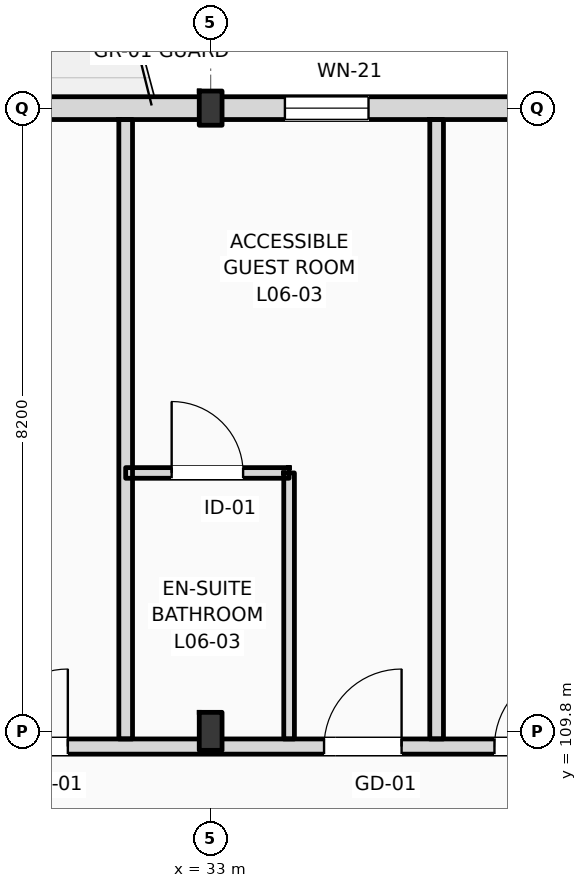
"""IFC4 building model, lengths in metres.
Left out: names, types, materials, properties, quantities, classifications, styles, units other than length and angle.
Written with IfcOpenShell. Run it as: python <this file> out.ifc"""

import sys

from ifc_helpers import new_model, si_unit, direction, frame, frame_2d, origin, origin_2d, place, context, subcontext, project, spatial, rectangle, i_section, extrude, element, fill, save


model = new_model("IFC4")
c1 = context("Model", 3, precision=1e-05, world=origin(), true_north=direction((0.0, 1.0)))
c2 = subcontext(c1, "Body", "Model", "MODEL_VIEW")
j1 = project(units=[si_unit("LENGTHUNIT", "METRE"), si_unit("PLANEANGLEUNIT", "RADIAN")], contexts=[c1])
p1 = place(None, origin())
s1 = spatial("IfcSite", under=j1, at=p1, CompositionType="ELEMENT")
p2 = place(p1, origin())
s2 = spatial("IfcBuilding", under=s1, at=p2, CompositionType="ELEMENT")
p3 = place(p2, frame((0.0, 0.0, 28.2)))
s3 = spatial("IfcBuildingStorey", under=s2, at=p3, CompositionType="ELEMENT", Elevation=28.2)
p4 = place(p3, frame((33.0, 109.8, 0.0), z_axis=(0.0, 0.0, 1.0), x_axis=(1.0, 0.0, 0.0)))
e1 = element("IfcColumn", 1, at=p4, inside=s3, PredefinedType="COLUMN", context=c2, shape_type="SweptSolid", body=[
    extrude(i_section(OverallWidth=0.3, OverallDepth=0.5, WebThickness=0.014, FlangeThickness=0.028, FilletRadius=0.027, at=origin_2d()), origin(), (0.0, 0.0, 1.0), 3.6),
])
p5 = place(p3, frame((33.0, 118.0, 0.0), z_axis=(0.0, 0.0, 1.0), x_axis=(1.0, 0.0, 0.0)))
e2 = element("IfcColumn", 2, at=p5, inside=s3, PredefinedType="COLUMN", context=c2, shape_type="SweptSolid", body=[
    extrude(i_section(OverallWidth=0.3, OverallDepth=0.45, WebThickness=0.014, FlangeThickness=0.026, FilletRadius=0.027, at=origin_2d()), origin(), (0.0, 0.0, 1.0), 3.6),
])
p6 = place(p3, frame((22.5, 118.0, 0.0), z_axis=(0.0, 0.0, 1.0), x_axis=(1.0, 0.0, 0.0)))
e3 = element("IfcWall", 3, at=p6, inside=s3, PredefinedType="STANDARD", context=c2, shape_type="SweptSolid", body=[
    extrude(rectangle(XDim=97.5, YDim=0.3, at=frame_2d((48.75, 0.0))), origin(), (0.0, 0.0, 1.0), 2.8),
])
p7 = place(p6, frame((0.91, 0.0, 0.9)))
e4 = element("IfcOpeningElement", 4, at=p7, cuts=e3, PredefinedType="OPENING", context=c2, shape_type="SweptSolid", body=[
    extrude(rectangle(XDim=0.9, YDim=1.72, at=frame_2d((0.45, 0.86))), frame((0.0, 0.16, 0.0), z_axis=(0.0, -1.0, 0.0), x_axis=(1.0, 0.0, 0.0)), (0.0, 0.0, 1.0), 0.32),
])
p8 = place(p6, frame((6.561, 0.0, 0.0)))
e5 = element("IfcOpeningElement", 5, at=p8, cuts=e3, PredefinedType="OPENING", context=c2, shape_type="SweptSolid", body=[
    extrude(rectangle(XDim=1.2, YDim=2.25, at=frame_2d((0.6, 1.125))), frame((0.0, 0.16, 0.0), z_axis=(0.0, -1.0, 0.0), x_axis=(1.0, 0.0, 0.0)), (0.0, 0.0, 1.0), 0.32),
])
p9 = place(p6, frame((11.477, 0.0, 0.9)))
e6 = element("IfcOpeningElement", 6, at=p9, cuts=e3, PredefinedType="OPENING", context=c2, shape_type="SweptSolid", body=[
    extrude(rectangle(XDim=1.1, YDim=1.5, at=frame_2d((0.55, 0.75))), frame((0.0, 0.16, 0.0), z_axis=(0.0, -1.0, 0.0), x_axis=(1.0, 0.0, 0.0)), (0.0, 0.0, 1.0), 0.32),
])
p10 = place(p6, frame((15.194, 0.0, 0.9)))
e7 = element("IfcOpeningElement", 7, at=p10, cuts=e3, PredefinedType="OPENING", context=c2, shape_type="SweptSolid", body=[
    extrude(rectangle(XDim=1.25, YDim=1.6, at=frame_2d((0.625, 0.8))), frame((0.0, 0.16, 0.0), z_axis=(0.0, -1.0, 0.0), x_axis=(1.0, 0.0, 0.0)), (0.0, 0.0, 1.0), 0.32),
])
p11 = place(p6, frame((19.509, 0.0, 0.9)))
e8 = element("IfcOpeningElement", 8, at=p11, cuts=e3, PredefinedType="OPENING", context=c2, shape_type="SweptSolid", body=[
    extrude(rectangle(XDim=1.4, YDim=1.7, at=frame_2d((0.7, 0.85))), frame((0.0, 0.16, 0.0), z_axis=(0.0, -1.0, 0.0), x_axis=(1.0, 0.0, 0.0)), (0.0, 0.0, 1.0), 0.32),
])
p12 = place(p6, frame((23.258, 0.0, 0.0)))
e9 = element("IfcOpeningElement", 9, at=p12, cuts=e3, PredefinedType="OPENING", context=c2, shape_type="SweptSolid", body=[
    extrude(rectangle(XDim=1.2, YDim=2.25, at=frame_2d((0.6, 1.125))), frame((0.0, 0.16, 0.0), z_axis=(0.0, -1.0, 0.0), x_axis=(1.0, 0.0, 0.0)), (0.0, 0.0, 1.0), 0.32),
])
p13 = place(p6, frame((28.115, 0.0, 0.9)))
e10 = element("IfcOpeningElement", 10, at=p13, cuts=e3, PredefinedType="OPENING", context=c2, shape_type="SweptSolid", body=[
    extrude(rectangle(XDim=1.75, YDim=1.72, at=frame_2d((0.875, 0.86))), frame((0.0, 0.16, 0.0), z_axis=(0.0, -1.0, 0.0), x_axis=(1.0, 0.0, 0.0)), (0.0, 0.0, 1.0), 0.32),
])
p14 = place(p6, frame((31.582, 0.0, 0.9)))
e11 = element("IfcOpeningElement", 11, at=p14, cuts=e3, PredefinedType="OPENING", context=c2, shape_type="SweptSolid", body=[
    extrude(rectangle(XDim=1.35, YDim=1.72, at=frame_2d((0.675, 0.86))), frame((0.0, 0.16, 0.0), z_axis=(0.0, -1.0, 0.0), x_axis=(1.0, 0.0, 0.0)), (0.0, 0.0, 1.0), 0.32),
])
p15 = place(p6, frame((37.379, 0.0, 0.0)))
e12 = element("IfcOpeningElement", 12, at=p15, cuts=e3, PredefinedType="OPENING", context=c2, shape_type="SweptSolid", body=[
    extrude(rectangle(XDim=1.2, YDim=2.25, at=frame_2d((0.6, 1.125))), frame((0.0, 0.16, 0.0), z_axis=(0.0, -1.0, 0.0), x_axis=(1.0, 0.0, 0.0)), (0.0, 0.0, 1.0), 0.32),
])
p16 = place(p6, frame((42.663, 0.0, 0.9)))
e13 = element("IfcOpeningElement", 13, at=p16, cuts=e3, PredefinedType="OPENING", context=c2, shape_type="SweptSolid", body=[
    extrude(rectangle(XDim=1.35, YDim=1.72, at=frame_2d((0.675, 0.86))), frame((0.0, 0.16, 0.0), z_axis=(0.0, -1.0, 0.0), x_axis=(1.0, 0.0, 0.0)), (0.0, 0.0, 1.0), 0.32),
])
p17 = place(p6, frame((45.119, 0.0, 0.9)))
e14 = element("IfcOpeningElement", 14, at=p17, cuts=e3, PredefinedType="OPENING", context=c2, shape_type="SweptSolid", body=[
    extrude(rectangle(XDim=2.871, YDim=1.72, at=frame_2d((1.436, 0.86))), frame((0.0, 0.16, 0.0), z_axis=(0.0, -1.0, 0.0), x_axis=(1.0, 0.0, 0.0)), (0.0, 0.0, 1.0), 0.32),
])
p18 = place(p6, frame((50.41, 0.0, 0.9)))
e15 = element("IfcOpeningElement", 15, at=p18, cuts=e3, PredefinedType="OPENING", context=c2, shape_type="SweptSolid", body=[
    extrude(rectangle(XDim=1.8, YDim=1.72, at=frame_2d((0.9, 0.86))), frame((0.0, 0.16, 0.0), z_axis=(0.0, -1.0, 0.0), x_axis=(1.0, 0.0, 0.0)), (0.0, 0.0, 1.0), 0.32),
])
p19 = place(p6, frame((54.375, 0.0, 0.0)))
e16 = element("IfcOpeningElement", 16, at=p19, cuts=e3, PredefinedType="OPENING", context=c2, shape_type="SweptSolid", body=[
    extrude(rectangle(XDim=1.2, YDim=2.25, at=frame_2d((0.6, 1.125))), frame((0.0, 0.16, 0.0), z_axis=(0.0, -1.0, 0.0), x_axis=(1.0, 0.0, 0.0)), (0.0, 0.0, 1.0), 0.32),
])
p20 = place(p6, frame((59.052, 0.0, 0.9)))
e17 = element("IfcOpeningElement", 17, at=p20, cuts=e3, PredefinedType="OPENING", context=c2, shape_type="SweptSolid", body=[
    extrude(rectangle(XDim=1.35, YDim=1.72, at=frame_2d((0.675, 0.86))), frame((0.0, 0.16, 0.0), z_axis=(0.0, -1.0, 0.0), x_axis=(1.0, 0.0, 0.0)), (0.0, 0.0, 1.0), 0.32),
])
p21 = place(p6, frame((62.768, 0.0, 0.9)))
e18 = element("IfcOpeningElement", 18, at=p21, cuts=e3, PredefinedType="OPENING", context=c2, shape_type="SweptSolid", body=[
    extrude(rectangle(XDim=1.5, YDim=1.72, at=frame_2d((0.75, 0.86))), frame((0.0, 0.16, 0.0), z_axis=(0.0, -1.0, 0.0), x_axis=(1.0, 0.0, 0.0)), (0.0, 0.0, 1.0), 0.32),
])
p22 = place(p6, frame((68.498, 0.0, 0.0)))
e19 = element("IfcOpeningElement", 19, at=p22, cuts=e3, PredefinedType="OPENING", context=c2, shape_type="SweptSolid", body=[
    extrude(rectangle(XDim=1.2, YDim=2.25, at=frame_2d((0.6, 1.125))), frame((0.0, 0.16, 0.0), z_axis=(0.0, -1.0, 0.0), x_axis=(1.0, 0.0, 0.0)), (0.0, 0.0, 1.0), 0.32),
])
p23 = place(p6, frame((71.265, 0.0, 0.9)))
e20 = element("IfcOpeningElement", 20, at=p23, cuts=e3, PredefinedType="OPENING", context=c2, shape_type="SweptSolid", body=[
    extrude(rectangle(XDim=0.9, YDim=1.72, at=frame_2d((0.45, 0.86))), frame((0.0, 0.16, 0.0), z_axis=(0.0, -1.0, 0.0), x_axis=(1.0, 0.0, 0.0)), (0.0, 0.0, 1.0), 0.32),
])
p24 = place(p6, frame((76.316, 0.0, 0.9)))
e21 = element("IfcOpeningElement", 21, at=p24, cuts=e3, PredefinedType="OPENING", context=c2, shape_type="SweptSolid", body=[
    extrude(rectangle(XDim=1.95, YDim=1.72, at=frame_2d((0.975, 0.86))), frame((0.0, 0.16, 0.0), z_axis=(0.0, -1.0, 0.0), x_axis=(1.0, 0.0, 0.0)), (0.0, 0.0, 1.0), 0.32),
])
p25 = place(p6, frame((81.632, 0.0, 0.9)))
e22 = element("IfcOpeningElement", 22, at=p25, cuts=e3, PredefinedType="OPENING", context=c2, shape_type="SweptSolid", body=[
    extrude(rectangle(XDim=1.35, YDim=1.72, at=frame_2d((0.675, 0.86))), frame((0.0, 0.16, 0.0), z_axis=(0.0, -1.0, 0.0), x_axis=(1.0, 0.0, 0.0)), (0.0, 0.0, 1.0), 0.32),
])
p26 = place(p6, frame((84.948, 0.0, 0.9)))
e23 = element("IfcOpeningElement", 23, at=p26, cuts=e3, PredefinedType="OPENING", context=c2, shape_type="SweptSolid", body=[
    extrude(rectangle(XDim=2.25, YDim=1.72, at=frame_2d((1.125, 0.86))), frame((0.0, 0.16, 0.0), z_axis=(0.0, -1.0, 0.0), x_axis=(1.0, 0.0, 0.0)), (0.0, 0.0, 1.0), 0.32),
])
p27 = place(p6, frame((90.063, 0.0, 0.9)))
e24 = element("IfcOpeningElement", 24, at=p27, cuts=e3, PredefinedType="OPENING", context=c2, shape_type="SweptSolid", body=[
    extrude(rectangle(XDim=1.8, YDim=1.72, at=frame_2d((0.9, 0.86))), frame((0.0, 0.16, 0.0), z_axis=(0.0, -1.0, 0.0), x_axis=(1.0, 0.0, 0.0)), (0.0, 0.0, 1.0), 0.32),
])
p28 = place(p6, frame((93.529, 0.0, 0.9)))
e25 = element("IfcOpeningElement", 25, at=p28, cuts=e3, PredefinedType="OPENING", context=c2, shape_type="SweptSolid", body=[
    extrude(rectangle(XDim=2.55, YDim=1.72, at=frame_2d((1.275, 0.86))), frame((0.0, 0.16, 0.0), z_axis=(0.0, -1.0, 0.0), x_axis=(1.0, 0.0, 0.0)), (0.0, 0.0, 1.0), 0.32),
])
p29 = place(p3, frame((10.65, 109.6, 0.0), z_axis=(0.0, 0.0, 1.0), x_axis=(1.0, 0.0, 0.0)))
e26 = element("IfcWall", 26, at=p29, inside=s3, PredefinedType="PARTITIONING", context=c2, shape_type="SweptSolid", body=[
    extrude(rectangle(XDim=109.21, YDim=0.2, at=frame_2d((54.605, 0.0))), origin(), (0.0, 0.0, 1.0), 2.8),
])
p30 = place(p29, frame((12.611, 0.0, 0.0)))
e27 = element("IfcOpeningElement", 27, at=p30, cuts=e26, PredefinedType="OPENING", context=c2, shape_type="SweptSolid", body=[
    extrude(rectangle(XDim=1.02, YDim=2.2, at=frame_2d((0.51, 1.1))), frame((0.0, 0.11, 0.0), z_axis=(0.0, -1.0, 0.0), x_axis=(1.0, 0.0, 0.0)), (0.0, 0.0, 1.0), 0.22),
])
p31 = place(p29, frame((19.451, 0.0, 0.0)))
e28 = element("IfcOpeningElement", 28, at=p31, cuts=e26, PredefinedType="OPENING", context=c2, shape_type="SweptSolid", body=[
    extrude(rectangle(XDim=1.02, YDim=2.2, at=frame_2d((0.51, 1.1))), frame((0.0, 0.11, 0.0), z_axis=(0.0, -1.0, 0.0), x_axis=(1.0, 0.0, 0.0)), (0.0, 0.0, 1.0), 0.22),
])
p32 = place(p29, frame((23.842, 0.0, 0.0)))
e29 = element("IfcOpeningElement", 29, at=p32, cuts=e26, PredefinedType="OPENING", context=c2, shape_type="SweptSolid", body=[
    extrude(rectangle(XDim=1.02, YDim=2.2, at=frame_2d((0.51, 1.1))), frame((0.0, 0.11, 0.0), z_axis=(0.0, -1.0, 0.0), x_axis=(1.0, 0.0, 0.0)), (0.0, 0.0, 1.0), 0.22),
])
p33 = place(p29, frame((26.084, 0.0, 0.0)))
e30 = element("IfcOpeningElement", 30, at=p33, cuts=e26, PredefinedType="OPENING", context=c2, shape_type="SweptSolid", body=[
    extrude(rectangle(XDim=1.02, YDim=2.2, at=frame_2d((0.51, 1.1))), frame((0.0, 0.11, 0.0), z_axis=(0.0, -1.0, 0.0), x_axis=(1.0, 0.0, 0.0)), (0.0, 0.0, 1.0), 0.22),
])
p34 = place(p29, frame((32.655, 0.0, 0.0)))
e31 = element("IfcOpeningElement", 31, at=p34, cuts=e26, PredefinedType="OPENING", context=c2, shape_type="SweptSolid", body=[
    extrude(rectangle(XDim=0.96, YDim=2.2, at=frame_2d((0.48, 1.1))), frame((0.0, 0.11, 0.0), z_axis=(0.0, -1.0, 0.0), x_axis=(1.0, 0.0, 0.0)), (0.0, 0.0, 1.0), 0.22),
])
p35 = place(p29, frame((34.895, 0.0, 0.0)))
e32 = element("IfcOpeningElement", 32, at=p35, cuts=e26, PredefinedType="OPENING", context=c2, shape_type="SweptSolid", body=[
    extrude(rectangle(XDim=0.96, YDim=2.2, at=frame_2d((0.48, 1.1))), frame((0.0, 0.11, 0.0), z_axis=(0.0, -1.0, 0.0), x_axis=(1.0, 0.0, 0.0)), (0.0, 0.0, 1.0), 0.22),
])
p36 = place(p29, frame((41.436, 0.0, 0.0)))
e33 = element("IfcOpeningElement", 33, at=p36, cuts=e26, PredefinedType="OPENING", context=c2, shape_type="SweptSolid", body=[
    extrude(rectangle(XDim=0.96, YDim=2.2, at=frame_2d((0.48, 1.1))), frame((0.0, 0.11, 0.0), z_axis=(0.0, -1.0, 0.0), x_axis=(1.0, 0.0, 0.0)), (0.0, 0.0, 1.0), 0.22),
])
p37 = place(p29, frame((43.427, 0.0, 0.0)))
e34 = element("IfcOpeningElement", 34, at=p37, cuts=e26, PredefinedType="OPENING", context=c2, shape_type="SweptSolid", body=[
    extrude(rectangle(XDim=0.96, YDim=2.2, at=frame_2d((0.48, 1.1))), frame((0.0, 0.11, 0.0), z_axis=(0.0, -1.0, 0.0), x_axis=(1.0, 0.0, 0.0)), (0.0, 0.0, 1.0), 0.22),
])
p38 = place(p29, frame((50.218, 0.0, 0.0)))
e35 = element("IfcOpeningElement", 35, at=p38, cuts=e26, PredefinedType="OPENING", context=c2, shape_type="SweptSolid", body=[
    extrude(rectangle(XDim=0.96, YDim=2.2, at=frame_2d((0.48, 1.1))), frame((0.0, 0.11, 0.0), z_axis=(0.0, -1.0, 0.0), x_axis=(1.0, 0.0, 0.0)), (0.0, 0.0, 1.0), 0.22),
])
p39 = place(p29, frame((54.859, 0.0, 0.0)))
e36 = element("IfcOpeningElement", 36, at=p39, cuts=e26, PredefinedType="OPENING", context=c2, shape_type="SweptSolid", body=[
    extrude(rectangle(XDim=0.96, YDim=2.2, at=frame_2d((0.48, 1.1))), frame((0.0, 0.11, 0.0), z_axis=(0.0, -1.0, 0.0), x_axis=(1.0, 0.0, 0.0)), (0.0, 0.0, 1.0), 0.22),
])
p40 = place(p29, frame((59.0, 0.0, 0.0)))
e37 = element("IfcOpeningElement", 37, at=p40, cuts=e26, PredefinedType="OPENING", context=c2, shape_type="SweptSolid", body=[
    extrude(rectangle(XDim=0.96, YDim=2.2, at=frame_2d((0.48, 1.1))), frame((0.0, 0.11, 0.0), z_axis=(0.0, -1.0, 0.0), x_axis=(1.0, 0.0, 0.0)), (0.0, 0.0, 1.0), 0.22),
])
p41 = place(p29, frame((63.39, 0.0, 0.0)))
e38 = element("IfcOpeningElement", 38, at=p41, cuts=e26, PredefinedType="OPENING", context=c2, shape_type="SweptSolid", body=[
    extrude(rectangle(XDim=0.96, YDim=2.2, at=frame_2d((0.48, 1.1))), frame((0.0, 0.11, 0.0), z_axis=(0.0, -1.0, 0.0), x_axis=(1.0, 0.0, 0.0)), (0.0, 0.0, 1.0), 0.22),
])
p42 = place(p29, frame((65.631, 0.0, 0.0)))
e39 = element("IfcOpeningElement", 39, at=p42, cuts=e26, PredefinedType="OPENING", context=c2, shape_type="SweptSolid", body=[
    extrude(rectangle(XDim=0.96, YDim=2.2, at=frame_2d((0.48, 1.1))), frame((0.0, 0.11, 0.0), z_axis=(0.0, -1.0, 0.0), x_axis=(1.0, 0.0, 0.0)), (0.0, 0.0, 1.0), 0.22),
])
p43 = place(p29, frame((72.172, 0.0, 0.0)))
e40 = element("IfcOpeningElement", 40, at=p43, cuts=e26, PredefinedType="OPENING", context=c2, shape_type="SweptSolid", body=[
    extrude(rectangle(XDim=0.96, YDim=2.2, at=frame_2d((0.48, 1.1))), frame((0.0, 0.11, 0.0), z_axis=(0.0, -1.0, 0.0), x_axis=(1.0, 0.0, 0.0)), (0.0, 0.0, 1.0), 0.22),
])
p44 = place(p29, frame((74.413, 0.0, 0.0)))
e41 = element("IfcOpeningElement", 41, at=p44, cuts=e26, PredefinedType="OPENING", context=c2, shape_type="SweptSolid", body=[
    extrude(rectangle(XDim=0.96, YDim=2.2, at=frame_2d((0.48, 1.1))), frame((0.0, 0.11, 0.0), z_axis=(0.0, -1.0, 0.0), x_axis=(1.0, 0.0, 0.0)), (0.0, 0.0, 1.0), 0.22),
])
p45 = place(p29, frame((80.954, 0.0, 0.0)))
e42 = element("IfcOpeningElement", 42, at=p45, cuts=e26, PredefinedType="OPENING", context=c2, shape_type="SweptSolid", body=[
    extrude(rectangle(XDim=0.96, YDim=2.2, at=frame_2d((0.48, 1.1))), frame((0.0, 0.11, 0.0), z_axis=(0.0, -1.0, 0.0), x_axis=(1.0, 0.0, 0.0)), (0.0, 0.0, 1.0), 0.22),
])
p46 = place(p29, frame((83.195, 0.0, 0.0)))
e43 = element("IfcOpeningElement", 43, at=p46, cuts=e26, PredefinedType="OPENING", context=c2, shape_type="SweptSolid", body=[
    extrude(rectangle(XDim=0.96, YDim=2.2, at=frame_2d((0.48, 1.1))), frame((0.0, 0.11, 0.0), z_axis=(0.0, -1.0, 0.0), x_axis=(1.0, 0.0, 0.0)), (0.0, 0.0, 1.0), 0.22),
])
p47 = place(p29, frame((89.735, 0.0, 0.0)))
e44 = element("IfcOpeningElement", 44, at=p47, cuts=e26, PredefinedType="OPENING", context=c2, shape_type="SweptSolid", body=[
    extrude(rectangle(XDim=0.96, YDim=2.2, at=frame_2d((0.48, 1.1))), frame((0.0, 0.11, 0.0), z_axis=(0.0, -1.0, 0.0), x_axis=(1.0, 0.0, 0.0)), (0.0, 0.0, 1.0), 0.22),
])
p48 = place(p29, frame((94.126, 0.0, 0.0)))
e45 = element("IfcOpeningElement", 45, at=p48, cuts=e26, PredefinedType="OPENING", context=c2, shape_type="SweptSolid", body=[
    extrude(rectangle(XDim=0.96, YDim=2.2, at=frame_2d((0.48, 1.1))), frame((0.0, 0.11, 0.0), z_axis=(0.0, -1.0, 0.0), x_axis=(1.0, 0.0, 0.0)), (0.0, 0.0, 1.0), 0.22),
])
p49 = place(p29, frame((98.517, 0.0, 0.0)))
e46 = element("IfcOpeningElement", 46, at=p49, cuts=e26, PredefinedType="OPENING", context=c2, shape_type="SweptSolid", body=[
    extrude(rectangle(XDim=0.96, YDim=2.2, at=frame_2d((0.48, 1.1))), frame((0.0, 0.11, 0.0), z_axis=(0.0, -1.0, 0.0), x_axis=(1.0, 0.0, 0.0)), (0.0, 0.0, 1.0), 0.22),
])
p50 = place(p29, frame((102.908, 0.0, 0.0)))
e47 = element("IfcOpeningElement", 47, at=p50, cuts=e26, PredefinedType="OPENING", context=c2, shape_type="SweptSolid", body=[
    extrude(rectangle(XDim=0.96, YDim=2.2, at=frame_2d((0.48, 1.1))), frame((0.0, 0.11, 0.0), z_axis=(0.0, -1.0, 0.0), x_axis=(1.0, 0.0, 0.0)), (0.0, 0.0, 1.0), 0.22),
])
p51 = place(p29, frame((105.099, 0.0, 0.0)))
e48 = element("IfcOpeningElement", 48, at=p51, cuts=e26, PredefinedType="OPENING", context=c2, shape_type="SweptSolid", body=[
    extrude(rectangle(XDim=0.96, YDim=2.2, at=frame_2d((0.48, 1.1))), frame((0.0, 0.11, 0.0), z_axis=(0.0, -1.0, 0.0), x_axis=(1.0, 0.0, 0.0)), (0.0, 0.0, 1.0), 0.22),
])
p52 = place(p29, frame((2.716, 0.0, 0.0)))
e49 = element("IfcOpeningElement", 49, at=p52, cuts=e26, PredefinedType="OPENING", context=c2, shape_type="SweptSolid", body=[
    extrude(rectangle(XDim=1.35, YDim=2.25, at=frame_2d((0.675, 1.125))), frame((0.0, 0.11, 0.0), z_axis=(0.0, -1.0, 0.0), x_axis=(1.0, 0.0, 0.0)), (0.0, 0.0, 1.0), 0.22),
])
p53 = place(p29, frame((6.65, 0.0, 0.0)))
e50 = element("IfcOpeningElement", 50, at=p53, cuts=e26, PredefinedType="OPENING", context=c2, shape_type="SweptSolid", body=[
    extrude(rectangle(XDim=1.35, YDim=2.25, at=frame_2d((0.675, 1.125))), frame((0.0, 0.11, 0.0), z_axis=(0.0, -1.0, 0.0), x_axis=(1.0, 0.0, 0.0)), (0.0, 0.0, 1.0), 0.22),
])
p54 = place(p29, frame((10.583, 0.0, 0.0)))
e51 = element("IfcOpeningElement", 51, at=p54, cuts=e26, PredefinedType="OPENING", context=c2, shape_type="SweptSolid", body=[
    extrude(rectangle(XDim=1.35, YDim=2.25, at=frame_2d((0.675, 1.125))), frame((0.0, 0.11, 0.0), z_axis=(0.0, -1.0, 0.0), x_axis=(1.0, 0.0, 0.0)), (0.0, 0.0, 1.0), 0.22),
])
for number, where, z_axis, x_axis in (
    (52, (31.882, 109.7, 0.0), (0.0, 0.0, 1.0), (0.0, 1.0, 0.0)),
    (53, (35.973, 109.7, 0.0), (0.0, 0.0, 1.0), (0.0, 1.0, 0.0)),
):
    element("IfcWall", number, at=place(p3, frame(where, z_axis=z_axis, x_axis=x_axis)), inside=s3, PredefinedType="PARTITIONING", context=c2, shape_type="SweptSolid", body=[
        extrude(rectangle(XDim=8.15, YDim=0.18, at=frame_2d((4.075, 0.0))), origin(), (0.0, 0.0, 1.0), 3.36),
    ])
p55 = place(p3, frame((34.032, 109.7, 0.0), z_axis=(0.0, 0.0, 1.0), x_axis=(0.0, 1.0, 0.0)))
e54 = element("IfcWall", 54, at=p55, inside=s3, PredefinedType="PARTITIONING", context=c2, shape_type="SweptSolid", body=[
    extrude(rectangle(XDim=3.5, YDim=0.14, at=frame_2d((1.75, 0.0))), origin(), (0.0, 0.0, 1.0), 3.36),
])
p56 = place(p3, frame((31.882, 113.2, 0.0), z_axis=(0.0, 0.0, 1.0), x_axis=(1.0, 0.0, 0.0)))
e55 = element("IfcWall", 55, at=p56, inside=s3, PredefinedType="PARTITIONING", context=c2, shape_type="SweptSolid", body=[
    extrude(rectangle(XDim=2.15, YDim=0.14, at=frame_2d((1.075, 0.0))), origin(), (0.0, 0.0, 1.0), 3.36),
])
p57 = place(p56, frame((0.605, 0.0, 0.0)))
e56 = element("IfcOpeningElement", 56, at=p57, cuts=e55, PredefinedType="OPENING", context=c2, shape_type="SweptSolid", body=[
    extrude(rectangle(XDim=0.94, YDim=2.15, at=frame_2d((0.47, 1.075))), frame((0.0, 0.08, 0.0), z_axis=(0.0, -1.0, 0.0), x_axis=(1.0, 0.0, 0.0)), (0.0, 0.0, 1.0), 0.16),
])
p58 = place(p9, origin())
e57 = element("IfcWindow", 57, at=p58, inside=s3, PartitioningType="DOUBLE_PANEL_VERTICAL", PredefinedType="WINDOW", context=c2, shape_type="SweptSolid", body=[
    extrude(rectangle(XDim=1.1, YDim=1.5, at=frame_2d((0.55, 0.75))), frame((0.0, 0.03, 0.0), z_axis=(0.0, -1.0, 0.0), x_axis=(1.0, 0.0, 0.0)), (0.0, 0.0, 1.0), 0.06),
])
fill(e6, e57)
p59 = place(p31, origin())
e58 = element("IfcDoor", 58, at=p59, inside=s3, OperationType="SINGLE_SWING_RIGHT", PredefinedType="DOOR", context=c2, shape_type="SweptSolid", body=[
    extrude(rectangle(XDim=1.02, YDim=2.2, at=frame_2d((0.51, 1.1))), frame((0.0, 0.025, 0.0), z_axis=(0.0, -1.0, 0.0), x_axis=(1.0, 0.0, 0.0)), (0.0, 0.0, 1.0), 0.05),
])
fill(e28, e58)
p60 = place(p32, origin())
e59 = element("IfcDoor", 59, at=p60, inside=s3, OperationType="SINGLE_SWING_RIGHT", PredefinedType="DOOR", context=c2, shape_type="SweptSolid", body=[
    extrude(rectangle(XDim=1.02, YDim=2.2, at=frame_2d((0.51, 1.1))), frame((0.0, 0.025, 0.0), z_axis=(0.0, -1.0, 0.0), x_axis=(1.0, 0.0, 0.0)), (0.0, 0.0, 1.0), 0.05),
])
fill(e29, e59)
p61 = place(p57, origin())
e60 = element("IfcDoor", 60, at=p61, inside=s3, OperationType="SINGLE_SWING_LEFT", PredefinedType="DOOR", context=c2, shape_type="SweptSolid", body=[
    extrude(rectangle(XDim=0.94, YDim=2.15, at=frame_2d((0.47, 1.075))), frame((0.0, 0.025, 0.0), z_axis=(0.0, -1.0, 0.0), x_axis=(1.0, 0.0, 0.0)), (0.0, 0.0, 1.0), 0.05),
])
fill(e56, e60)
p62 = place(p33, origin())
e61 = element("IfcDoor", 61, at=p62, inside=s3, OperationType="SINGLE_SWING_RIGHT", PredefinedType="DOOR", context=c2, shape_type="SweptSolid", body=[
    extrude(rectangle(XDim=1.02, YDim=2.2, at=frame_2d((0.51, 1.1))), frame((0.0, 0.025, 0.0), z_axis=(0.0, -1.0, 0.0), x_axis=(1.0, 0.0, 0.0)), (0.0, 0.0, 1.0), 0.05),
])
fill(e30, e61)
save(model, sys.argv[1])
